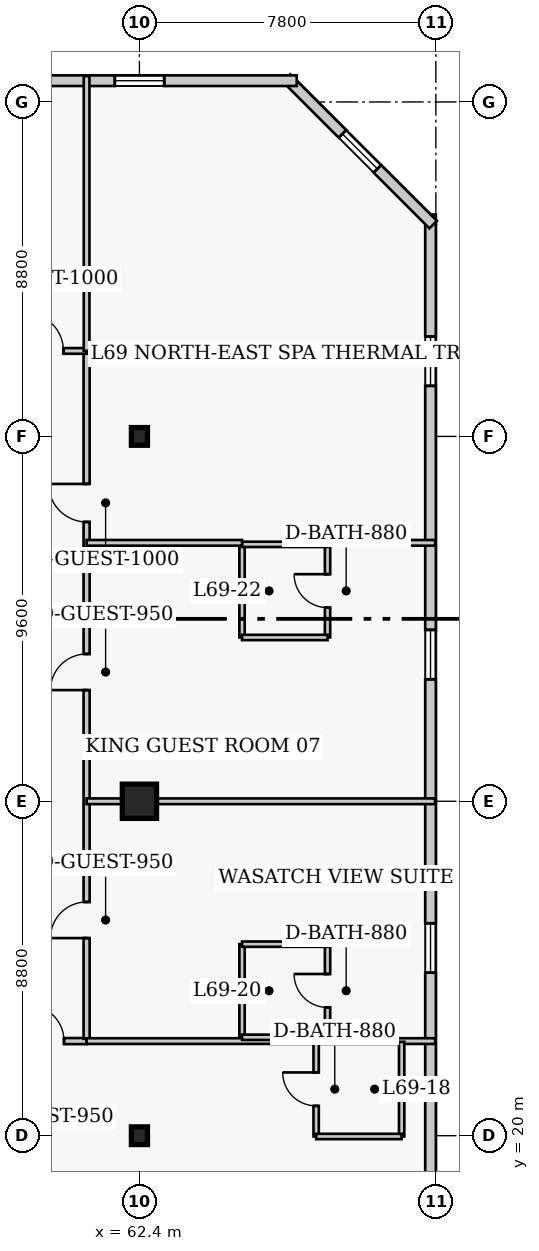
"""IFC4 building model, lengths in metres.
Left out: names, types, materials, properties, quantities, classifications, styles, units other than length and angle.
Written with IfcOpenShell. Run it as: python <this file> out.ifc"""

import sys

from ifc_helpers import new_model, si_unit, direction, frame, frame_2d, origin, origin_2d, place, context, subcontext, project, spatial, rectangle, i_section, extrude, element, fill, save


model = new_model("IFC4")
c1 = context("Model", 3, precision=1e-05, world=origin(), true_north=direction((0.0, 1.0)))
c2 = subcontext(c1, "Body", "Model", "MODEL_VIEW")
j1 = project(units=[si_unit("LENGTHUNIT", "METRE"), si_unit("PLANEANGLEUNIT", "RADIAN")], contexts=[c1])
p1 = place(None, origin())
s1 = spatial("IfcSite", under=j1, at=p1, CompositionType="ELEMENT")
p2 = place(p1, origin())
s2 = spatial("IfcBuilding", under=s1, at=p2, CompositionType="ELEMENT")
p3 = place(p2, frame((0.0, 0.0, 277.4)))
s3 = spatial("IfcBuildingStorey", under=s2, at=p3, CompositionType="ELEMENT", Elevation=277.4)
p4 = place(p3, frame((62.4, 20.0, 0.0), z_axis=(0.0, 0.0, 1.0), x_axis=(1.0, 0.0, 0.0)))
e1 = element("IfcColumn", 1, at=p4, inside=s3, PredefinedType="COLUMN", context=c2, shape_type="SweptSolid", body=[
    extrude(i_section(OverallWidth=0.422, OverallDepth=0.465, WebThickness=0.045, FlangeThickness=0.073, FilletRadius=0.017, at=origin_2d()), origin(), (0.0, 0.0, 1.0), 4.0),
])
p5 = place(p3, frame((62.4, 28.8, 0.0), z_axis=(0.0, 0.0, 1.0), x_axis=(1.0, 0.0, 0.0)))
e2 = element("IfcColumn", 2, at=p5, inside=s3, PredefinedType="COLUMN", context=c2, shape_type="SweptSolid", body=[
    extrude(rectangle(XDim=0.9, YDim=0.9, at=origin_2d()), origin(), (0.0, 0.0, 1.0), 4.0),
])
p6 = place(p3, frame((62.4, 38.4, 0.0), z_axis=(0.0, 0.0, 1.0), x_axis=(1.0, 0.0, 0.0)))
e3 = element("IfcColumn", 3, at=p6, inside=s3, PredefinedType="COLUMN", context=c2, shape_type="SweptSolid", body=[
    extrude(i_section(OverallWidth=0.422, OverallDepth=0.465, WebThickness=0.045, FlangeThickness=0.073, FilletRadius=0.017, at=origin_2d()), origin(), (0.0, 0.0, 1.0), 4.0),
])
p7 = place(p3, frame((70.06, 13.36, 0.0), z_axis=(0.0, 0.0, 1.0), x_axis=(0.0, 1.0, 0.0)))
e4 = element("IfcWall", 4, at=p7, inside=s3, PredefinedType="SOLIDWALL", context=c2, shape_type="SweptSolid", body=[
    extrude(rectangle(XDim=30.88, YDim=0.28, at=frame_2d((15.44, 0.0))), origin(), (0.0, 0.0, 1.0), 3.76),
])
p8 = place(p7, frame((3.21, 0.0, 0.85)))
e5 = element("IfcOpeningElement", 5, at=p8, cuts=e4, PredefinedType="OPENING", context=c2, shape_type="SweptSolid", body=[
    extrude(rectangle(XDim=1.3, YDim=1.7, at=frame_2d((0.65, 0.85))), frame((0.0, 0.15, 0.0), z_axis=(0.0, -1.0, 0.0), x_axis=(1.0, 0.0, 0.0)), (0.0, 0.0, 1.0), 0.3),
])
p9 = place(p7, frame((10.93, 0.0, 0.85)))
e6 = element("IfcOpeningElement", 6, at=p9, cuts=e4, PredefinedType="OPENING", context=c2, shape_type="SweptSolid", body=[
    extrude(rectangle(XDim=1.3, YDim=1.7, at=frame_2d((0.65, 0.85))), frame((0.0, 0.15, 0.0), z_axis=(0.0, -1.0, 0.0), x_axis=(1.0, 0.0, 0.0)), (0.0, 0.0, 1.0), 0.3),
])
p10 = place(p7, frame((18.65, 0.0, 0.85)))
e7 = element("IfcOpeningElement", 7, at=p10, cuts=e4, PredefinedType="OPENING", context=c2, shape_type="SweptSolid", body=[
    extrude(rectangle(XDim=1.3, YDim=1.7, at=frame_2d((0.65, 0.85))), frame((0.0, 0.15, 0.0), z_axis=(0.0, -1.0, 0.0), x_axis=(1.0, 0.0, 0.0)), (0.0, 0.0, 1.0), 0.3),
])
p11 = place(p7, frame((26.37, 0.0, 0.85)))
e8 = element("IfcOpeningElement", 8, at=p11, cuts=e4, PredefinedType="OPENING", context=c2, shape_type="SweptSolid", body=[
    extrude(rectangle(XDim=1.3, YDim=1.7, at=frame_2d((0.65, 0.85))), frame((0.0, 0.15, 0.0), z_axis=(0.0, -1.0, 0.0), x_axis=(1.0, 0.0, 0.0)), (0.0, 0.0, 1.0), 0.3),
])
p12 = place(p3, frame((70.129, 43.973, 0.0), z_axis=(0.0, 0.0, 1.0), x_axis=(-0.707106781187, 0.707106781187, 0.0)))
e9 = element("IfcWall", 9, at=p12, inside=s3, PredefinedType="SOLIDWALL", context=c2, shape_type="SweptSolid", body=[
    extrude(rectangle(XDim=5.454, YDim=0.28, at=frame_2d((2.727, 0.0))), origin(), (0.0, 0.0, 1.0), 3.76),
])
p13 = place(p12, frame((2.077, 0.0, 0.85)))
e10 = element("IfcOpeningElement", 10, at=p13, cuts=e9, PredefinedType="OPENING", context=c2, shape_type="SweptSolid", body=[
    extrude(rectangle(XDim=1.3, YDim=1.7, at=frame_2d((0.65, 0.85))), frame((0.0, 0.15, 0.0), z_axis=(0.0, -1.0, 0.0), x_axis=(1.0, 0.0, 0.0)), (0.0, 0.0, 1.0), 0.3),
])
p14 = place(p3, frame((66.54, 47.76, 0.0), z_axis=(0.0, 0.0, 1.0), x_axis=(-1.0, 0.0, 0.0)))
e11 = element("IfcWall", 11, at=p14, inside=s3, PredefinedType="SOLIDWALL", context=c2, shape_type="SweptSolid", body=[
    extrude(rectangle(XDim=24.83, YDim=0.28, at=frame_2d((12.415, 0.0))), origin(), (0.0, 0.0, 1.0), 3.76),
])
p15 = place(p14, frame((3.488, 0.0, 0.85)))
e12 = element("IfcOpeningElement", 12, at=p15, cuts=e11, PredefinedType="OPENING", context=c2, shape_type="SweptSolid", body=[
    extrude(rectangle(XDim=1.3, YDim=1.7, at=frame_2d((0.65, 0.85))), frame((0.0, 0.15, 0.0), z_axis=(0.0, -1.0, 0.0), x_axis=(1.0, 0.0, 0.0)), (0.0, 0.0, 1.0), 0.3),
])
p16 = place(p14, frame((12.915, 0.0, 0.85)))
e13 = element("IfcOpeningElement", 13, at=p16, cuts=e11, PredefinedType="OPENING", context=c2, shape_type="SweptSolid", body=[
    extrude(rectangle(XDim=1.3, YDim=1.7, at=frame_2d((0.65, 0.85))), frame((0.0, 0.15, 0.0), z_axis=(0.0, -1.0, 0.0), x_axis=(1.0, 0.0, 0.0)), (0.0, 0.0, 1.0), 0.3),
])
p17 = place(p14, frame((20.692, 0.0, 0.85)))
e14 = element("IfcOpeningElement", 14, at=p17, cuts=e11, PredefinedType="OPENING", context=c2, shape_type="SweptSolid", body=[
    extrude(rectangle(XDim=1.3, YDim=1.7, at=frame_2d((0.65, 0.85))), frame((0.0, 0.15, 0.0), z_axis=(0.0, -1.0, 0.0), x_axis=(1.0, 0.0, 0.0)), (0.0, 0.0, 1.0), 0.3),
])
p18 = place(p3, frame((35.8, 22.49, 0.0), z_axis=(0.0, 0.0, 1.0), x_axis=(1.0, 0.0, 0.0)))
e15 = element("IfcWall", 15, at=p18, inside=s3, PredefinedType="PARTITIONING", context=c2, shape_type="SweptSolid", body=[
    extrude(rectangle(XDim=25.21, YDim=0.16, at=frame_2d((12.605, 0.0))), origin(), (0.0, 0.0, 1.0), 3.76),
])
p19 = place(p18, frame((5.522, 0.0, 0.0)))
e16 = element("IfcOpeningElement", 16, at=p19, cuts=e15, PredefinedType="OPENING", context=c2, shape_type="SweptSolid", body=[
    extrude(rectangle(XDim=1.0, YDim=2.15, at=frame_2d((0.5, 1.075))), frame((0.0, 0.09, 0.0), z_axis=(0.0, -1.0, 0.0), x_axis=(1.0, 0.0, 0.0)), (0.0, 0.0, 1.0), 0.18),
])
p20 = place(p18, frame((18.198, 0.0, 0.0)))
e17 = element("IfcOpeningElement", 17, at=p20, cuts=e15, PredefinedType="OPENING", context=c2, shape_type="SweptSolid", body=[
    extrude(rectangle(XDim=0.95, YDim=2.1, at=frame_2d((0.475, 1.05))), frame((0.0, 0.09, 0.0), z_axis=(0.0, -1.0, 0.0), x_axis=(1.0, 0.0, 0.0)), (0.0, 0.0, 1.0), 0.18),
])
p21 = place(p18, frame((23.665, 0.0, 0.0)))
e18 = element("IfcOpeningElement", 18, at=p21, cuts=e15, PredefinedType="OPENING", context=c2, shape_type="SweptSolid", body=[
    extrude(rectangle(XDim=0.95, YDim=2.1, at=frame_2d((0.475, 1.05))), frame((0.0, 0.09, 0.0), z_axis=(0.0, -1.0, 0.0), x_axis=(1.0, 0.0, 0.0)), (0.0, 0.0, 1.0), 0.18),
])
p22 = place(p3, frame((61.01, 22.55, 0.0), z_axis=(0.0, 0.0, 1.0), x_axis=(0.0, 1.0, 0.0)))
e19 = element("IfcWall", 19, at=p22, inside=s3, PredefinedType="PARTITIONING", context=c2, shape_type="SweptSolid", body=[
    extrude(rectangle(XDim=18.1, YDim=0.16, at=frame_2d((9.05, 0.0))), origin(), (0.0, 0.0, 1.0), 3.76),
])
p23 = place(p22, frame((2.65, 0.0, 0.0)))
e20 = element("IfcOpeningElement", 20, at=p23, cuts=e19, PredefinedType="OPENING", context=c2, shape_type="SweptSolid", body=[
    extrude(rectangle(XDim=0.95, YDim=2.1, at=frame_2d((0.475, 1.05))), frame((0.0, 0.09, 0.0), z_axis=(0.0, -1.0, 0.0), x_axis=(1.0, 0.0, 0.0)), (0.0, 0.0, 1.0), 0.18),
])
p24 = place(p22, frame((9.175, 0.0, 0.0)))
e21 = element("IfcOpeningElement", 21, at=p24, cuts=e19, PredefinedType="OPENING", context=c2, shape_type="SweptSolid", body=[
    extrude(rectangle(XDim=0.95, YDim=2.1, at=frame_2d((0.475, 1.05))), frame((0.0, 0.09, 0.0), z_axis=(0.0, -1.0, 0.0), x_axis=(1.0, 0.0, 0.0)), (0.0, 0.0, 1.0), 0.18),
])
p25 = place(p22, frame((13.6, 0.0, 0.0)))
e22 = element("IfcOpeningElement", 22, at=p25, cuts=e19, PredefinedType="OPENING", context=c2, shape_type="SweptSolid", body=[
    extrude(rectangle(XDim=1.0, YDim=2.15, at=frame_2d((0.5, 1.075))), frame((0.0, 0.09, 0.0), z_axis=(0.0, -1.0, 0.0), x_axis=(1.0, 0.0, 0.0)), (0.0, 0.0, 1.0), 0.18),
])
p26 = place(p3, frame((56.8, 40.65, 0.0), z_axis=(0.0, 0.0, 1.0), x_axis=(1.0, 0.0, 0.0)))
e23 = element("IfcWall", 23, at=p26, inside=s3, PredefinedType="PARTITIONING", context=c2, shape_type="SweptSolid", body=[
    extrude(rectangle(XDim=4.21, YDim=0.15, at=frame_2d((2.105, 0.0))), origin(), (0.0, 0.0, 1.0), 3.76),
])
p27 = place(p26, frame((2.6, 0.0, 0.0)))
e24 = element("IfcOpeningElement", 24, at=p27, cuts=e23, PredefinedType="OPENING", context=c2, shape_type="SweptSolid", body=[
    extrude(rectangle(XDim=1.0, YDim=2.15, at=frame_2d((0.5, 1.075))), frame((0.0, 0.085, 0.0), z_axis=(0.0, -1.0, 0.0), x_axis=(1.0, 0.0, 0.0)), (0.0, 0.0, 1.0), 0.17),
])
p28 = place(p3, frame((61.01, 40.65, 0.0), z_axis=(0.0, 0.0, 1.0), x_axis=(0.0, 1.0, 0.0)))
e25 = element("IfcWall", 25, at=p28, inside=s3, PredefinedType="PARTITIONING", context=c2, shape_type="SweptSolid", body=[
    extrude(rectangle(XDim=7.23, YDim=0.15, at=frame_2d((3.615, 0.0))), origin(), (0.0, 0.0, 1.0), 3.76),
])
p29 = place(p3, frame((61.01, 22.49, 0.0), z_axis=(0.0, 0.0, 1.0), x_axis=(1.0, 0.0, 0.0)))
e26 = element("IfcWall", 26, at=p29, inside=s3, PredefinedType="PARTITIONING", context=c2, shape_type="SweptSolid", body=[
    extrude(rectangle(XDim=9.17, YDim=0.15, at=frame_2d((4.585, 0.0))), origin(), (0.0, 0.0, 1.0), 3.76),
])
p30 = place(p3, frame((67.05, 19.98, 0.0), z_axis=(0.0, 0.0, 1.0), x_axis=(0.0, 1.0, 0.0)))
e27 = element("IfcWall", 27, at=p30, inside=s3, PredefinedType="PLUMBINGWALL", context=c2, shape_type="SweptSolid", body=[
    extrude(rectangle(XDim=2.49, YDim=0.14, at=frame_2d((1.245, 0.0))), origin(), (0.0, 0.0, 1.0), 3.76),
])
p31 = place(p30, frame((0.805, 0.0, 0.0)))
e28 = element("IfcOpeningElement", 28, at=p31, cuts=e27, PredefinedType="OPENING", context=c2, shape_type="SweptSolid", body=[
    extrude(rectangle(XDim=0.88, YDim=2.05, at=frame_2d((0.44, 1.025))), frame((0.0, 0.08, 0.0), z_axis=(0.0, -1.0, 0.0), x_axis=(1.0, 0.0, 0.0)), (0.0, 0.0, 1.0), 0.16),
])
p32 = place(p3, frame((69.3, 19.98, 0.0), z_axis=(0.0, 0.0, 1.0), x_axis=(0.0, 1.0, 0.0)))
e29 = element("IfcWall", 29, at=p32, inside=s3, PredefinedType="PLUMBINGWALL", context=c2, shape_type="SweptSolid", body=[
    extrude(rectangle(XDim=2.49, YDim=0.14, at=frame_2d((1.245, 0.0))), origin(), (0.0, 0.0, 1.0), 3.76),
])
p33 = place(p3, frame((67.05, 19.98, 0.0), z_axis=(0.0, 0.0, 1.0), x_axis=(1.0, 0.0, 0.0)))
e30 = element("IfcWall", 30, at=p33, inside=s3, PredefinedType="PLUMBINGWALL", context=c2, shape_type="SweptSolid", body=[
    extrude(rectangle(XDim=2.25, YDim=0.14, at=frame_2d((1.125, 0.0))), origin(), (0.0, 0.0, 1.0), 3.76),
])
p34 = place(p3, frame((65.1, 22.59, 0.0), z_axis=(0.0, 0.0, 1.0), x_axis=(0.0, 1.0, 0.0)))
e31 = element("IfcWall", 31, at=p34, inside=s3, PredefinedType="PLUMBINGWALL", context=c2, shape_type="SweptSolid", body=[
    extrude(rectangle(XDim=2.45, YDim=0.14, at=frame_2d((1.225, 0.0))), origin(), (0.0, 0.0, 1.0), 3.76),
])
p35 = place(p3, frame((67.35, 22.59, 0.0), z_axis=(0.0, 0.0, 1.0), x_axis=(0.0, 1.0, 0.0)))
e32 = element("IfcWall", 32, at=p35, inside=s3, PredefinedType="PLUMBINGWALL", context=c2, shape_type="SweptSolid", body=[
    extrude(rectangle(XDim=2.45, YDim=0.14, at=frame_2d((1.225, 0.0))), origin(), (0.0, 0.0, 1.0), 3.76),
])
p36 = place(p35, frame((0.785, 0.0, 0.0)))
e33 = element("IfcOpeningElement", 33, at=p36, cuts=e32, PredefinedType="OPENING", context=c2, shape_type="SweptSolid", body=[
    extrude(rectangle(XDim=0.88, YDim=2.05, at=frame_2d((0.44, 1.025))), frame((0.0, 0.08, 0.0), z_axis=(0.0, -1.0, 0.0), x_axis=(1.0, 0.0, 0.0)), (0.0, 0.0, 1.0), 0.16),
])
for number, where, z_axis, x_axis in (
    (34, (65.1, 22.59, 0.0), (0.0, 0.0, 1.0), (1.0, 0.0, 0.0)),
    (35, (65.1, 25.04, 0.0), (0.0, 0.0, 1.0), (1.0, 0.0, 0.0)),
):
    element("IfcWall", number, at=place(p3, frame(where, z_axis=z_axis, x_axis=x_axis)), inside=s3, PredefinedType="PLUMBINGWALL", context=c2, shape_type="SweptSolid", body=[
        extrude(rectangle(XDim=2.25, YDim=0.14, at=frame_2d((1.125, 0.0))), origin(), (0.0, 0.0, 1.0), 3.76),
    ])
p37 = place(p3, frame((61.01, 28.8, 0.0), z_axis=(0.0, 0.0, 1.0), x_axis=(1.0, 0.0, 0.0)))
e36 = element("IfcWall", 36, at=p37, inside=s3, PredefinedType="PARTITIONING", context=c2, shape_type="SweptSolid", body=[
    extrude(rectangle(XDim=9.17, YDim=0.15, at=frame_2d((4.585, 0.0))), origin(), (0.0, 0.0, 1.0), 3.064),
])
p38 = place(p3, frame((65.1, 33.11, 0.0), z_axis=(0.0, 0.0, 1.0), x_axis=(0.0, 1.0, 0.0)))
e37 = element("IfcWall", 37, at=p38, inside=s3, PredefinedType="PLUMBINGWALL", context=c2, shape_type="SweptSolid", body=[
    extrude(rectangle(XDim=2.45, YDim=0.14, at=frame_2d((1.225, 0.0))), origin(), (0.0, 0.0, 1.0), 3.76),
])
p39 = place(p3, frame((67.35, 33.11, 0.0), z_axis=(0.0, 0.0, 1.0), x_axis=(0.0, 1.0, 0.0)))
e38 = element("IfcWall", 38, at=p39, inside=s3, PredefinedType="PLUMBINGWALL", context=c2, shape_type="SweptSolid", body=[
    extrude(rectangle(XDim=2.45, YDim=0.14, at=frame_2d((1.225, 0.0))), origin(), (0.0, 0.0, 1.0), 3.76),
])
p40 = place(p39, frame((0.785, 0.0, 0.0)))
e39 = element("IfcOpeningElement", 39, at=p40, cuts=e38, PredefinedType="OPENING", context=c2, shape_type="SweptSolid", body=[
    extrude(rectangle(XDim=0.88, YDim=2.05, at=frame_2d((0.44, 1.025))), frame((0.0, 0.08, 0.0), z_axis=(0.0, -1.0, 0.0), x_axis=(1.0, 0.0, 0.0)), (0.0, 0.0, 1.0), 0.16),
])
for number, where, z_axis, x_axis in (
    (40, (65.1, 33.11, 0.0), (0.0, 0.0, 1.0), (1.0, 0.0, 0.0)),
    (41, (65.1, 35.56, 0.0), (0.0, 0.0, 1.0), (1.0, 0.0, 0.0)),
):
    element("IfcWall", number, at=place(p3, frame(where, z_axis=z_axis, x_axis=x_axis)), inside=s3, PredefinedType="PLUMBINGWALL", context=c2, shape_type="SweptSolid", body=[
        extrude(rectangle(XDim=2.25, YDim=0.14, at=frame_2d((1.125, 0.0))), origin(), (0.0, 0.0, 1.0), 3.76),
    ])
p41 = place(p3, frame((61.01, 35.6, 0.0), z_axis=(0.0, 0.0, 1.0), x_axis=(1.0, 0.0, 0.0)))
e42 = element("IfcWall", 42, at=p41, inside=s3, PredefinedType="PARTITIONING", context=c2, shape_type="SweptSolid", body=[
    extrude(rectangle(XDim=4.09, YDim=0.15, at=frame_2d((2.045, 0.0))), origin(), (0.0, 0.0, 1.0), 3.76),
])
p42 = place(p3, frame((67.35, 35.6, 0.0), z_axis=(0.0, 0.0, 1.0), x_axis=(1.0, 0.0, 0.0)))
e43 = element("IfcWall", 43, at=p42, inside=s3, PredefinedType="PARTITIONING", context=c2, shape_type="SweptSolid", body=[
    extrude(rectangle(XDim=2.83, YDim=0.15, at=frame_2d((1.415, 0.0))), origin(), (0.0, 0.0, 1.0), 3.76),
])
p43 = place(p9, origin())
e44 = element("IfcWindow", 44, at=p43, inside=s3, PartitioningType="SINGLE_PANEL", PredefinedType="WINDOW", context=c2, shape_type="SweptSolid", body=[
    extrude(rectangle(XDim=1.3, YDim=1.7, at=frame_2d((0.65, 0.85))), frame((0.0, 0.03, 0.0), z_axis=(0.0, -1.0, 0.0), x_axis=(1.0, 0.0, 0.0)), (0.0, 0.0, 1.0), 0.06),
])
fill(e6, e44)
p44 = place(p10, origin())
e45 = element("IfcWindow", 45, at=p44, inside=s3, PartitioningType="SINGLE_PANEL", PredefinedType="WINDOW", context=c2, shape_type="SweptSolid", body=[
    extrude(rectangle(XDim=1.3, YDim=1.7, at=frame_2d((0.65, 0.85))), frame((0.0, 0.03, 0.0), z_axis=(0.0, -1.0, 0.0), x_axis=(1.0, 0.0, 0.0)), (0.0, 0.0, 1.0), 0.06),
])
fill(e7, e45)
p45 = place(p11, origin())
e46 = element("IfcWindow", 46, at=p45, inside=s3, PartitioningType="SINGLE_PANEL", PredefinedType="WINDOW", context=c2, shape_type="SweptSolid", body=[
    extrude(rectangle(XDim=1.3, YDim=1.7, at=frame_2d((0.65, 0.85))), frame((0.0, 0.03, 0.0), z_axis=(0.0, -1.0, 0.0), x_axis=(1.0, 0.0, 0.0)), (0.0, 0.0, 1.0), 0.06),
])
fill(e8, e46)
p46 = place(p13, origin())
e47 = element("IfcWindow", 47, at=p46, inside=s3, PartitioningType="SINGLE_PANEL", PredefinedType="WINDOW", context=c2, shape_type="SweptSolid", body=[
    extrude(rectangle(XDim=1.3, YDim=1.7, at=frame_2d((0.65, 0.85))), frame((0.0, 0.03, 0.0), z_axis=(0.0, -1.0, 0.0), x_axis=(1.0, 0.0, 0.0)), (0.0, 0.0, 1.0), 0.06),
])
fill(e10, e47)
p47 = place(p15, origin())
e48 = element("IfcWindow", 48, at=p47, inside=s3, PartitioningType="SINGLE_PANEL", PredefinedType="WINDOW", context=c2, shape_type="SweptSolid", body=[
    extrude(rectangle(XDim=1.3, YDim=1.7, at=frame_2d((0.65, 0.85))), frame((0.0, 0.03, 0.0), z_axis=(0.0, -1.0, 0.0), x_axis=(1.0, 0.0, 0.0)), (0.0, 0.0, 1.0), 0.06),
])
fill(e12, e48)
p48 = place(p27, origin())
e49 = element("IfcDoor", 49, at=p48, inside=s3, OperationType="SINGLE_SWING_LEFT", PredefinedType="DOOR", context=c2, shape_type="SweptSolid", body=[
    extrude(rectangle(XDim=1.0, YDim=2.15, at=frame_2d((0.5, 1.075))), frame((0.0, 0.025, 0.0), z_axis=(0.0, -1.0, 0.0), x_axis=(1.0, 0.0, 0.0)), (0.0, 0.0, 1.0), 0.05),
])
fill(e24, e49)
p49 = place(p31, origin())
e50 = element("IfcDoor", 50, at=p49, inside=s3, OperationType="SINGLE_SWING_RIGHT", PredefinedType="DOOR", context=c2, shape_type="SweptSolid", body=[
    extrude(rectangle(XDim=0.88, YDim=2.05, at=frame_2d((0.44, 1.025))), frame((0.0, 0.025, 0.0), z_axis=(0.0, -1.0, 0.0), x_axis=(1.0, 0.0, 0.0)), (0.0, 0.0, 1.0), 0.05),
])
fill(e28, e50)
p50 = place(p21, origin())
e51 = element("IfcDoor", 51, at=p50, inside=s3, OperationType="SINGLE_SWING_LEFT", PredefinedType="DOOR", context=c2, shape_type="SweptSolid", body=[
    extrude(rectangle(XDim=0.95, YDim=2.1, at=frame_2d((0.475, 1.05))), frame((0.0, 0.025, 0.0), z_axis=(0.0, -1.0, 0.0), x_axis=(1.0, 0.0, 0.0)), (0.0, 0.0, 1.0), 0.05),
])
fill(e18, e51)
p51 = place(p36, origin())
e52 = element("IfcDoor", 52, at=p51, inside=s3, OperationType="SINGLE_SWING_RIGHT", PredefinedType="DOOR", context=c2, shape_type="SweptSolid", body=[
    extrude(rectangle(XDim=0.88, YDim=2.05, at=frame_2d((0.44, 1.025))), frame((0.0, 0.025, 0.0), z_axis=(0.0, -1.0, 0.0), x_axis=(1.0, 0.0, 0.0)), (0.0, 0.0, 1.0), 0.05),
])
fill(e33, e52)
p52 = place(p23, origin())
e53 = element("IfcDoor", 53, at=p52, inside=s3, OperationType="SINGLE_SWING_LEFT", PredefinedType="DOOR", context=c2, shape_type="SweptSolid", body=[
    extrude(rectangle(XDim=0.95, YDim=2.1, at=frame_2d((0.475, 1.05))), frame((0.0, 0.025, 0.0), z_axis=(0.0, -1.0, 0.0), x_axis=(1.0, 0.0, 0.0)), (0.0, 0.0, 1.0), 0.05),
])
fill(e20, e53)
p53 = place(p40, origin())
e54 = element("IfcDoor", 54, at=p53, inside=s3, OperationType="SINGLE_SWING_RIGHT", PredefinedType="DOOR", context=c2, shape_type="SweptSolid", body=[
    extrude(rectangle(XDim=0.88, YDim=2.05, at=frame_2d((0.44, 1.025))), frame((0.0, 0.025, 0.0), z_axis=(0.0, -1.0, 0.0), x_axis=(1.0, 0.0, 0.0)), (0.0, 0.0, 1.0), 0.05),
])
fill(e39, e54)
p54 = place(p24, origin())
e55 = element("IfcDoor", 55, at=p54, inside=s3, OperationType="SINGLE_SWING_LEFT", PredefinedType="DOOR", context=c2, shape_type="SweptSolid", body=[
    extrude(rectangle(XDim=0.95, YDim=2.1, at=frame_2d((0.475, 1.05))), frame((0.0, 0.025, 0.0), z_axis=(0.0, -1.0, 0.0), x_axis=(1.0, 0.0, 0.0)), (0.0, 0.0, 1.0), 0.05),
])
fill(e21, e55)
p55 = place(p25, origin())
e56 = element("IfcDoor", 56, at=p55, inside=s3, OperationType="SINGLE_SWING_RIGHT", PredefinedType="DOOR", context=c2, shape_type="SweptSolid", body=[
    extrude(rectangle(XDim=1.0, YDim=2.15, at=frame_2d((0.5, 1.075))), frame((0.0, 0.025, 0.0), z_axis=(0.0, -1.0, 0.0), x_axis=(1.0, 0.0, 0.0)), (0.0, 0.0, 1.0), 0.05),
])
fill(e22, e56)
save(model, sys.argv[1])
